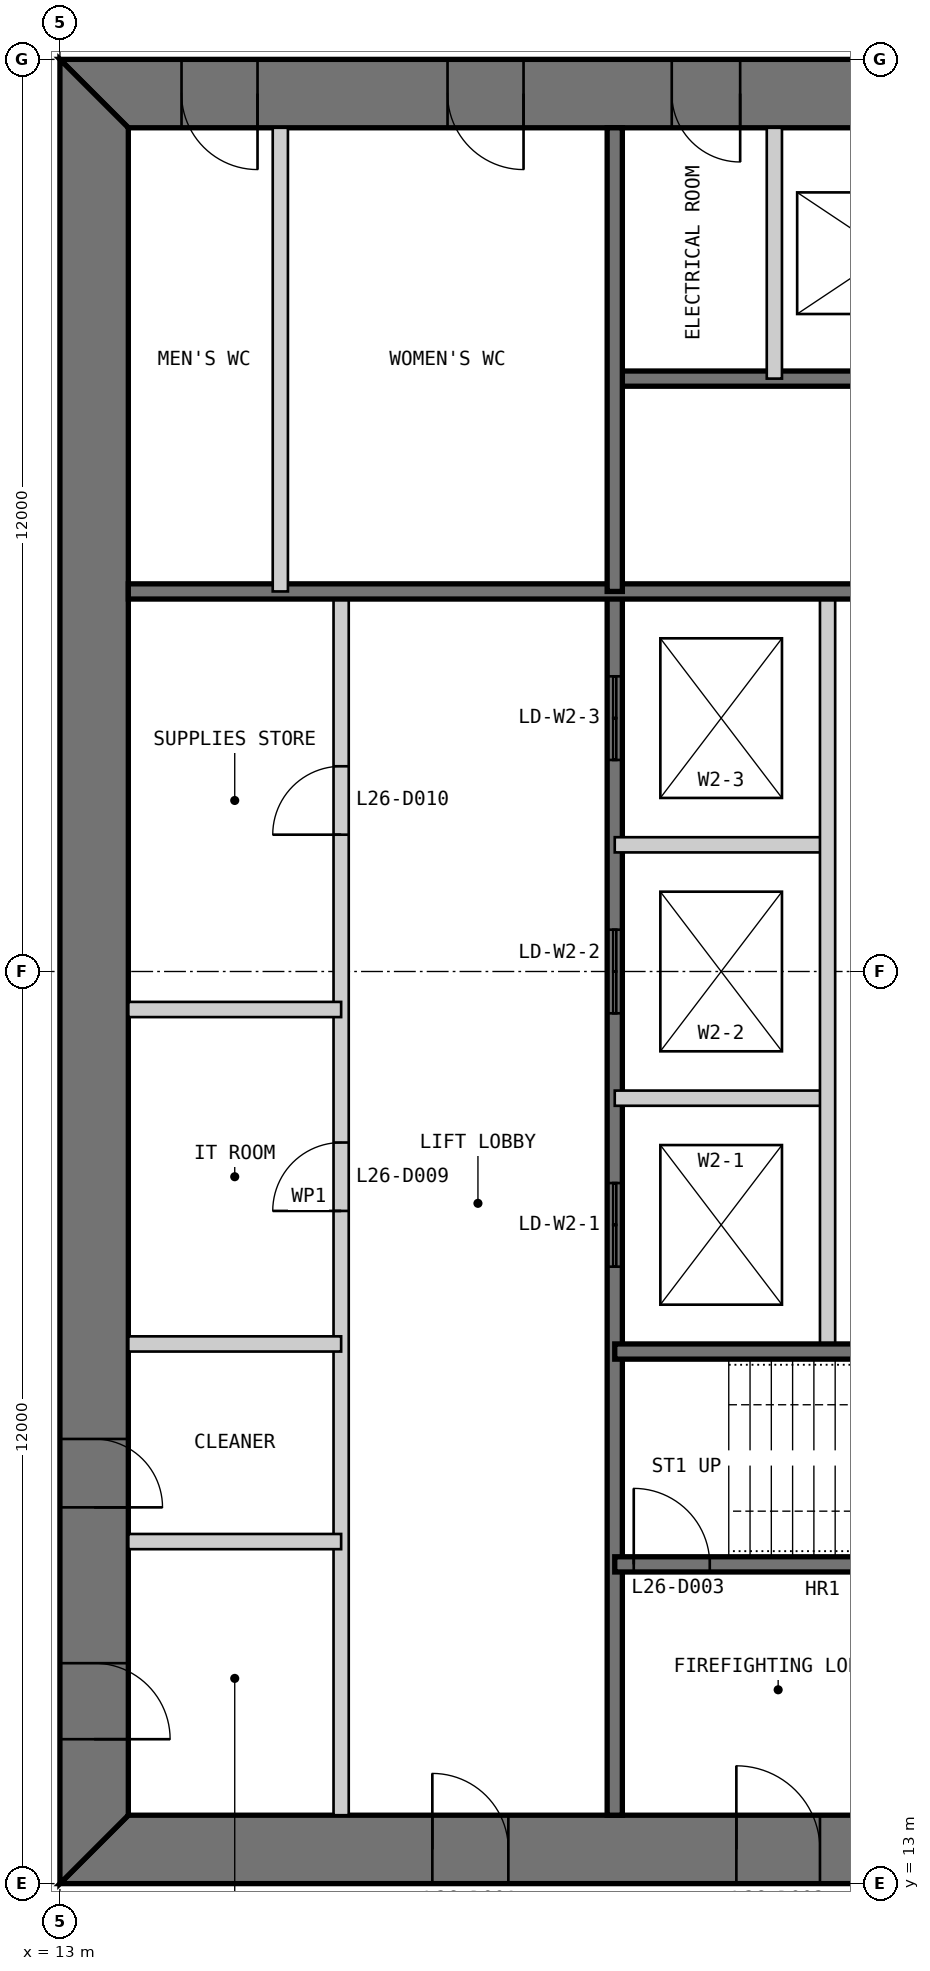
"""IFC4 building model, lengths in metres.
Left out: names, types, materials, properties, quantities, classifications, styles, units other than length and angle.
Written with IfcOpenShell. Run it as: python <this file> out.ifc"""

import sys

from ifc_helpers import new_model, si_unit, direction, frame, frame_2d, origin, place, context, subcontext, project, spatial, polyline, rectangle, outline, extrude, element, fill, save


model = new_model("IFC4")
c1 = context("Model", 3, precision=1e-05, world=origin(), true_north=direction((0.0, 1.0)))
c2 = subcontext(c1, "Body", "Model", "MODEL_VIEW")
j1 = project(units=[si_unit("LENGTHUNIT", "METRE"), si_unit("PLANEANGLEUNIT", "RADIAN")], contexts=[c1])
p1 = place(None, origin())
s1 = spatial("IfcSite", under=j1, at=p1, CompositionType="ELEMENT")
p2 = place(p1, origin())
s2 = spatial("IfcBuilding", under=s1, at=p2, CompositionType="ELEMENT")
p3 = place(p2, frame((0.0, 0.0, 114.4)))
s3 = spatial("IfcBuildingStorey", under=s2, at=p3, CompositionType="ELEMENT", Elevation=114.4)
p4 = place(p3, frame((13.0, 13.45, 0.0), z_axis=(0.0, 0.0, 1.0), x_axis=(1.0, 0.0, 0.0)))
e1 = element("IfcWall", 1, at=p4, inside=s3, PredefinedType="SHEAR", context=c2, shape_type="SweptSolid", body=[
    extrude(outline(polyline([(0.0, -0.45), (24.0, -0.45), (23.1, 0.45), (0.9, 0.45), (0.0, -0.45)])), origin(), (0.0, 0.0, 1.0), 4.0),
])
p5 = place(p4, frame((4.9, 0.0, 0.0)))
e2 = element("IfcOpeningElement", 2, at=p5, cuts=e1, PredefinedType="OPENING", context=c2, shape_type="SweptSolid", body=[
    extrude(rectangle(XDim=1.0, YDim=2.2, at=frame_2d((0.5, 1.1))), frame((0.0, 0.46, 0.0), z_axis=(0.0, -1.0, 0.0), x_axis=(1.0, 0.0, 0.0)), (0.0, 0.0, 1.0), 0.92),
])
p6 = place(p4, frame((8.9, 0.0, 0.0)))
e3 = element("IfcOpeningElement", 3, at=p6, cuts=e1, PredefinedType="OPENING", context=c2, shape_type="SweptSolid", body=[
    extrude(rectangle(XDim=1.1, YDim=2.2, at=frame_2d((0.55, 1.1))), frame((0.0, 0.46, 0.0), z_axis=(0.0, -1.0, 0.0), x_axis=(1.0, 0.0, 0.0)), (0.0, 0.0, 1.0), 0.92),
])
p7 = place(p4, frame((15.05, 0.0, 0.0)))
e4 = element("IfcOpeningElement", 4, at=p7, cuts=e1, PredefinedType="OPENING", context=c2, shape_type="SweptSolid", body=[
    extrude(rectangle(XDim=0.9, YDim=2.2, at=frame_2d((0.45, 1.1))), frame((0.0, 0.46, 0.0), z_axis=(0.0, -1.0, 0.0), x_axis=(1.0, 0.0, 0.0)), (0.0, 0.0, 1.0), 0.92),
])
p8 = place(p4, frame((17.9, 0.0, 0.0)))
e5 = element("IfcOpeningElement", 5, at=p8, cuts=e1, PredefinedType="OPENING", context=c2, shape_type="SweptSolid", body=[
    extrude(rectangle(XDim=1.0, YDim=2.2, at=frame_2d((0.5, 1.1))), frame((0.0, 0.46, 0.0), z_axis=(0.0, -1.0, 0.0), x_axis=(1.0, 0.0, 0.0)), (0.0, 0.0, 1.0), 0.92),
])
p9 = place(p4, frame((21.4, 0.0, 0.0)))
e6 = element("IfcOpeningElement", 6, at=p9, cuts=e1, PredefinedType="OPENING", context=c2, shape_type="SweptSolid", body=[
    extrude(rectangle(XDim=1.0, YDim=2.2, at=frame_2d((0.5, 1.1))), frame((0.0, 0.46, 0.0), z_axis=(0.0, -1.0, 0.0), x_axis=(1.0, 0.0, 0.0)), (0.0, 0.0, 1.0), 0.92),
])
p10 = place(p3, frame((37.0, 36.55, 0.0), z_axis=(0.0, 0.0, 1.0), x_axis=(-1.0, 0.0, 0.0)))
e7 = element("IfcWall", 7, at=p10, inside=s3, PredefinedType="SHEAR", context=c2, shape_type="SweptSolid", body=[
    extrude(outline(polyline([(0.0, -0.45), (24.0, -0.45), (23.1, 0.45), (0.9, 0.45), (0.0, -0.45)])), origin(), (0.0, 0.0, 1.0), 4.0),
])
p11 = place(p10, frame((4.9, 0.0, 0.0)))
e8 = element("IfcOpeningElement", 8, at=p11, cuts=e7, PredefinedType="OPENING", context=c2, shape_type="SweptSolid", body=[
    extrude(rectangle(XDim=1.0, YDim=2.2, at=frame_2d((0.5, 1.1))), frame((0.0, 0.46, 0.0), z_axis=(0.0, -1.0, 0.0), x_axis=(1.0, 0.0, 0.0)), (0.0, 0.0, 1.0), 0.92),
])
p12 = place(p10, frame((8.9, 0.0, 0.0)))
e9 = element("IfcOpeningElement", 9, at=p12, cuts=e7, PredefinedType="OPENING", context=c2, shape_type="SweptSolid", body=[
    extrude(rectangle(XDim=1.1, YDim=2.2, at=frame_2d((0.55, 1.1))), frame((0.0, 0.46, 0.0), z_axis=(0.0, -1.0, 0.0), x_axis=(1.0, 0.0, 0.0)), (0.0, 0.0, 1.0), 0.92),
])
p13 = place(p10, frame((15.05, 0.0, 0.0)))
e10 = element("IfcOpeningElement", 10, at=p13, cuts=e7, PredefinedType="OPENING", context=c2, shape_type="SweptSolid", body=[
    extrude(rectangle(XDim=0.9, YDim=2.2, at=frame_2d((0.45, 1.1))), frame((0.0, 0.46, 0.0), z_axis=(0.0, -1.0, 0.0), x_axis=(1.0, 0.0, 0.0)), (0.0, 0.0, 1.0), 0.92),
])
p14 = place(p10, frame((17.9, 0.0, 0.0)))
e11 = element("IfcOpeningElement", 11, at=p14, cuts=e7, PredefinedType="OPENING", context=c2, shape_type="SweptSolid", body=[
    extrude(rectangle(XDim=1.0, YDim=2.2, at=frame_2d((0.5, 1.1))), frame((0.0, 0.46, 0.0), z_axis=(0.0, -1.0, 0.0), x_axis=(1.0, 0.0, 0.0)), (0.0, 0.0, 1.0), 0.92),
])
p15 = place(p10, frame((21.4, 0.0, 0.0)))
e12 = element("IfcOpeningElement", 12, at=p15, cuts=e7, PredefinedType="OPENING", context=c2, shape_type="SweptSolid", body=[
    extrude(rectangle(XDim=1.0, YDim=2.2, at=frame_2d((0.5, 1.1))), frame((0.0, 0.46, 0.0), z_axis=(0.0, -1.0, 0.0), x_axis=(1.0, 0.0, 0.0)), (0.0, 0.0, 1.0), 0.92),
])
p16 = place(p3, frame((13.45, 36.1, 0.0), z_axis=(0.0, 0.0, 1.0), x_axis=(0.0, -1.0, 0.0)))
e13 = element("IfcWall", 13, at=p16, inside=s3, PredefinedType="SHEAR", context=c2, shape_type="SweptSolid", body=[
    extrude(outline(polyline([(-0.9, -0.45), (23.1, -0.45), (22.2, 0.45), (0.0, 0.45), (-0.9, -0.45)])), origin(), (0.0, 0.0, 1.0), 4.0),
])
p17 = place(p16, frame((20.2, 0.0, 0.0)))
e14 = element("IfcOpeningElement", 14, at=p17, cuts=e13, PredefinedType="OPENING", context=c2, shape_type="SweptSolid", body=[
    extrude(rectangle(XDim=1.0, YDim=2.2, at=frame_2d((0.5, 1.1))), frame((0.0, 0.46, 0.0), z_axis=(0.0, -1.0, 0.0), x_axis=(1.0, 0.0, 0.0)), (0.0, 0.0, 1.0), 0.92),
])
p18 = place(p16, frame((17.25, 0.0, 0.0)))
e15 = element("IfcOpeningElement", 15, at=p18, cuts=e13, PredefinedType="OPENING", context=c2, shape_type="SweptSolid", body=[
    extrude(rectangle(XDim=0.9, YDim=2.2, at=frame_2d((0.45, 1.1))), frame((0.0, 0.46, 0.0), z_axis=(0.0, -1.0, 0.0), x_axis=(1.0, 0.0, 0.0)), (0.0, 0.0, 1.0), 0.92),
])
p19 = place(p3, frame((16.7, 13.9, 0.0), z_axis=(0.0, 0.0, 1.0), x_axis=(0.0, 1.0, 0.0)))
e16 = element("IfcWall", 16, at=p19, inside=s3, PredefinedType="PARTITIONING", context=c2, shape_type="SweptSolid", body=[
    extrude(rectangle(XDim=16.1, YDim=0.2, at=frame_2d((8.05, 0.0))), origin(), (0.0, 0.0, 1.0), 3.8),
])
p20 = place(p19, frame((7.95, 0.0, 0.0)))
e17 = element("IfcOpeningElement", 17, at=p20, cuts=e16, PredefinedType="OPENING", context=c2, shape_type="SweptSolid", body=[
    extrude(rectangle(XDim=0.9, YDim=2.2, at=frame_2d((0.45, 1.1))), frame((0.0, 0.11, 0.0), z_axis=(0.0, -1.0, 0.0), x_axis=(1.0, 0.0, 0.0)), (0.0, 0.0, 1.0), 0.22),
])
p21 = place(p19, frame((12.9, 0.0, 0.0)))
e18 = element("IfcOpeningElement", 18, at=p21, cuts=e16, PredefinedType="OPENING", context=c2, shape_type="SweptSolid", body=[
    extrude(rectangle(XDim=0.9, YDim=2.2, at=frame_2d((0.45, 1.1))), frame((0.0, 0.11, 0.0), z_axis=(0.0, -1.0, 0.0), x_axis=(1.0, 0.0, 0.0)), (0.0, 0.0, 1.0), 0.22),
])
p22 = place(p3, frame((20.3, 13.9, 0.0), z_axis=(0.0, 0.0, 1.0), x_axis=(0.0, 1.0, 0.0)))
e19 = element("IfcWall", 19, at=p22, inside=s3, PredefinedType="SOLIDWALL", context=c2, shape_type="SweptSolid", body=[
    extrude(rectangle(XDim=16.1, YDim=0.2, at=frame_2d((8.05, 0.0))), origin(), (0.0, 0.0, 1.0), 3.8),
])
p23 = place(p22, frame((7.217, 0.0, 0.0)))
e20 = element("IfcOpeningElement", 20, at=p23, cuts=e19, PredefinedType="OPENING", context=c2, shape_type="SweptSolid", body=[
    extrude(rectangle(XDim=1.1, YDim=2.2, at=frame_2d((0.55, 1.1))), frame((0.0, 0.11, 0.0), z_axis=(0.0, -1.0, 0.0), x_axis=(1.0, 0.0, 0.0)), (0.0, 0.0, 1.0), 0.22),
])
p24 = place(p22, frame((10.55, 0.0, 0.0)))
e21 = element("IfcOpeningElement", 21, at=p24, cuts=e19, PredefinedType="OPENING", context=c2, shape_type="SweptSolid", body=[
    extrude(rectangle(XDim=1.1, YDim=2.2, at=frame_2d((0.55, 1.1))), frame((0.0, 0.11, 0.0), z_axis=(0.0, -1.0, 0.0), x_axis=(1.0, 0.0, 0.0)), (0.0, 0.0, 1.0), 0.22),
])
p25 = place(p22, frame((13.883, 0.0, 0.0)))
e22 = element("IfcOpeningElement", 22, at=p25, cuts=e19, PredefinedType="OPENING", context=c2, shape_type="SweptSolid", body=[
    extrude(rectangle(XDim=1.1, YDim=2.2, at=frame_2d((0.55, 1.1))), frame((0.0, 0.11, 0.0), z_axis=(0.0, -1.0, 0.0), x_axis=(1.0, 0.0, 0.0)), (0.0, 0.0, 1.0), 0.22),
])
for number, where, z_axis, x_axis in (
    (23, (20.3, 23.333, 0.0), (0.0, 0.0, 1.0), (1.0, 0.0, 0.0)),
    (24, (20.3, 26.667, 0.0), (0.0, 0.0, 1.0), (1.0, 0.0, 0.0)),
):
    element("IfcWall", number, at=place(p3, frame(where, z_axis=z_axis, x_axis=x_axis)), inside=s3, PredefinedType="PARTITIONING", context=c2, shape_type="SweptSolid", body=[
        extrude(rectangle(XDim=2.8, YDim=0.2, at=frame_2d((1.4, 0.0))), origin(), (0.0, 0.0, 1.0), 3.8),
    ])
p26 = place(p3, frame((23.1, 20.0, 0.0), z_axis=(0.0, 0.0, 1.0), x_axis=(0.0, 1.0, 0.0)))
e25 = element("IfcWall", 25, at=p26, inside=s3, PredefinedType="PARTITIONING", context=c2, shape_type="SweptSolid", body=[
    extrude(rectangle(XDim=10.0, YDim=0.2, at=frame_2d((5.0, 0.0))), origin(), (0.0, 0.0, 1.0), 3.8),
])
p27 = place(p3, frame((20.3, 17.2, 0.0), z_axis=(0.0, 0.0, 1.0), x_axis=(1.0, 0.0, 0.0)))
e26 = element("IfcWall", 26, at=p27, inside=s3, PredefinedType="SOLIDWALL", context=c2, shape_type="SweptSolid", body=[
    extrude(rectangle(XDim=9.4, YDim=0.2, at=frame_2d((4.7, 0.0))), origin(), (0.0, 0.0, 1.0), 3.8),
])
p28 = place(p27, frame((0.25, 0.0, 0.0)))
e27 = element("IfcOpeningElement", 27, at=p28, cuts=e26, PredefinedType="OPENING", context=c2, shape_type="SweptSolid", body=[
    extrude(rectangle(XDim=1.0, YDim=2.2, at=frame_2d((0.5, 1.1))), frame((0.0, 0.11, 0.0), z_axis=(0.0, -1.0, 0.0), x_axis=(1.0, 0.0, 0.0)), (0.0, 0.0, 1.0), 0.22),
])
p29 = place(p3, frame((20.3, 20.0, 0.0), z_axis=(0.0, 0.0, 1.0), x_axis=(1.0, 0.0, 0.0)))
e28 = element("IfcWall", 28, at=p29, inside=s3, PredefinedType="SOLIDWALL", context=c2, shape_type="SweptSolid", body=[
    extrude(rectangle(XDim=15.8, YDim=0.2, at=frame_2d((7.9, 0.0))), origin(), (0.0, 0.0, 1.0), 3.8),
])
for number, where, z_axis, x_axis in (
    (29, (13.9, 17.5, 0.0), (0.0, 0.0, 1.0), (1.0, 0.0, 0.0)),
    (30, (13.9, 20.1, 0.0), (0.0, 0.0, 1.0), (1.0, 0.0, 0.0)),
    (31, (13.9, 24.5, 0.0), (0.0, 0.0, 1.0), (1.0, 0.0, 0.0)),
):
    element("IfcWall", number, at=place(p3, frame(where, z_axis=z_axis, x_axis=x_axis)), inside=s3, PredefinedType="PARTITIONING", context=c2, shape_type="SweptSolid", body=[
        extrude(rectangle(XDim=2.8, YDim=0.2, at=frame_2d((1.4, 0.0))), origin(), (0.0, 0.0, 1.0), 3.8),
    ])
p30 = place(p3, frame((29.7, 32.8, 0.0), z_axis=(0.0, 0.0, 1.0), x_axis=(-1.0, 0.0, 0.0)))
e32 = element("IfcWall", 32, at=p30, inside=s3, PredefinedType="SOLIDWALL", context=c2, shape_type="SweptSolid", body=[
    extrude(rectangle(XDim=9.4, YDim=0.2, at=frame_2d((4.7, 0.0))), origin(), (0.0, 0.0, 1.0), 3.8),
])
p31 = place(p30, frame((0.25, 0.0, 0.0)))
e33 = element("IfcOpeningElement", 33, at=p31, cuts=e32, PredefinedType="OPENING", context=c2, shape_type="SweptSolid", body=[
    extrude(rectangle(XDim=1.0, YDim=2.2, at=frame_2d((0.5, 1.1))), frame((0.0, 0.11, 0.0), z_axis=(0.0, -1.0, 0.0), x_axis=(1.0, 0.0, 0.0)), (0.0, 0.0, 1.0), 0.22),
])
p32 = place(p3, frame((29.7, 30.0, 0.0), z_axis=(0.0, 0.0, 1.0), x_axis=(-1.0, 0.0, 0.0)))
e34 = element("IfcWall", 34, at=p32, inside=s3, PredefinedType="SOLIDWALL", context=c2, shape_type="SweptSolid", body=[
    extrude(rectangle(XDim=15.8, YDim=0.2, at=frame_2d((7.9, 0.0))), origin(), (0.0, 0.0, 1.0), 3.8),
])
p33 = place(p3, frame((22.4, 36.1, 0.0), z_axis=(0.0, 0.0, 1.0), x_axis=(0.0, -1.0, 0.0)))
e35 = element("IfcWall", 35, at=p33, inside=s3, PredefinedType="PARTITIONING", context=c2, shape_type="SweptSolid", body=[
    extrude(rectangle(XDim=3.3, YDim=0.2, at=frame_2d((1.65, 0.0))), origin(), (0.0, 0.0, 1.0), 3.8),
])
p34 = place(p3, frame((20.3, 36.1, 0.0), z_axis=(0.0, 0.0, 1.0), x_axis=(0.0, -1.0, 0.0)))
e36 = element("IfcWall", 36, at=p34, inside=s3, PredefinedType="SOLIDWALL", context=c2, shape_type="SweptSolid", body=[
    extrude(rectangle(XDim=6.1, YDim=0.2, at=frame_2d((3.05, 0.0))), origin(), (0.0, 0.0, 1.0), 3.8),
])
p35 = place(p3, frame((15.9, 36.1, 0.0), z_axis=(0.0, 0.0, 1.0), x_axis=(0.0, -1.0, 0.0)))
e37 = element("IfcWall", 37, at=p35, inside=s3, PredefinedType="PARTITIONING", context=c2, shape_type="SweptSolid", body=[
    extrude(rectangle(XDim=6.1, YDim=0.2, at=frame_2d((3.05, 0.0))), origin(), (0.0, 0.0, 1.0), 3.8),
])
p36 = place(p5, origin())
e38 = element("IfcDoor", 38, at=p36, inside=s3, OperationType="SINGLE_SWING_LEFT", PredefinedType="DOOR", context=c2, shape_type="SweptSolid", body=[
    extrude(rectangle(XDim=1.0, YDim=2.2, at=frame_2d((0.5, 1.1))), frame((0.0, 0.025, 0.0), z_axis=(0.0, -1.0, 0.0), x_axis=(1.0, 0.0, 0.0)), (0.0, 0.0, 1.0), 0.05),
    extrude(outline(polyline([(0.0, 0.0), (0.04, 0.0), (0.04, 2.16), (0.96, 2.16), (0.96, 0.0), (1.0, 0.0), (1.0, 2.2), (0.0, 2.2), (0.0, 0.0)])), frame((0.0, 0.3, 0.0), z_axis=(0.0, -1.0, 0.0), x_axis=(1.0, 0.0, 0.0)), (0.0, 0.0, 1.0), 0.6),
])
fill(e2, e38)
p37 = place(p6, origin())
e39 = element("IfcDoor", 39, at=p37, inside=s3, OperationType="SINGLE_SWING_LEFT", PredefinedType="DOOR", context=c2, shape_type="SweptSolid", body=[
    extrude(rectangle(XDim=1.1, YDim=2.2, at=frame_2d((0.55, 1.1))), frame((0.0, 0.025, 0.0), z_axis=(0.0, -1.0, 0.0), x_axis=(1.0, 0.0, 0.0)), (0.0, 0.0, 1.0), 0.05),
    extrude(outline(polyline([(0.0, 0.0), (0.04, 0.0), (0.04, 2.16), (1.06, 2.16), (1.06, 0.0), (1.1, 0.0), (1.1, 2.2), (0.0, 2.2), (0.0, 0.0)])), frame((0.0, 0.3, 0.0), z_axis=(0.0, -1.0, 0.0), x_axis=(1.0, 0.0, 0.0)), (0.0, 0.0, 1.0), 0.6),
])
fill(e3, e39)
p38 = place(p28, origin())
e40 = element("IfcDoor", 40, at=p38, inside=s3, OperationType="SINGLE_SWING_LEFT", PredefinedType="DOOR", context=c2, shape_type="SweptSolid", body=[
    extrude(rectangle(XDim=1.0, YDim=2.2, at=frame_2d((0.5, 1.1))), frame((0.0, 0.025, 0.0), z_axis=(0.0, -1.0, 0.0), x_axis=(1.0, 0.0, 0.0)), (0.0, 0.0, 1.0), 0.05),
])
fill(e27, e40)
p39 = place(p17, origin())
e41 = element("IfcDoor", 41, at=p39, inside=s3, OperationType="SINGLE_SWING_RIGHT", PredefinedType="DOOR", context=c2, shape_type="SweptSolid", body=[
    extrude(rectangle(XDim=1.0, YDim=2.2, at=frame_2d((0.5, 1.1))), frame((0.0, 0.025, 0.0), z_axis=(0.0, -1.0, 0.0), x_axis=(1.0, 0.0, 0.0)), (0.0, 0.0, 1.0), 0.05),
    extrude(outline(polyline([(0.0, 0.0), (0.04, 0.0), (0.04, 2.16), (0.96, 2.16), (0.96, 0.0), (1.0, 0.0), (1.0, 2.2), (0.0, 2.2), (0.0, 0.0)])), frame((0.0, 0.3, 0.0), z_axis=(0.0, -1.0, 0.0), x_axis=(1.0, 0.0, 0.0)), (0.0, 0.0, 1.0), 0.6),
])
fill(e14, e41)
p40 = place(p18, origin())
e42 = element("IfcDoor", 42, at=p40, inside=s3, OperationType="SINGLE_SWING_RIGHT", PredefinedType="DOOR", context=c2, shape_type="SweptSolid", body=[
    extrude(rectangle(XDim=0.9, YDim=2.2, at=frame_2d((0.45, 1.1))), frame((0.0, 0.025, 0.0), z_axis=(0.0, -1.0, 0.0), x_axis=(1.0, 0.0, 0.0)), (0.0, 0.0, 1.0), 0.05),
    extrude(outline(polyline([(0.0, 0.0), (0.04, 0.0), (0.04, 2.16), (0.86, 2.16), (0.86, 0.0), (0.9, 0.0), (0.9, 2.2), (0.0, 2.2), (0.0, 0.0)])), frame((0.0, 0.3, 0.0), z_axis=(0.0, -1.0, 0.0), x_axis=(1.0, 0.0, 0.0)), (0.0, 0.0, 1.0), 0.6),
])
fill(e15, e42)
p41 = place(p20, origin())
e43 = element("IfcDoor", 43, at=p41, inside=s3, OperationType="SINGLE_SWING_LEFT", PredefinedType="DOOR", context=c2, shape_type="SweptSolid", body=[
    extrude(rectangle(XDim=0.9, YDim=2.2, at=frame_2d((0.45, 1.1))), frame((0.0, 0.025, 0.0), z_axis=(0.0, -1.0, 0.0), x_axis=(1.0, 0.0, 0.0)), (0.0, 0.0, 1.0), 0.05),
])
fill(e17, e43)
p42 = place(p21, origin())
e44 = element("IfcDoor", 44, at=p42, inside=s3, OperationType="SINGLE_SWING_LEFT", PredefinedType="DOOR", context=c2, shape_type="SweptSolid", body=[
    extrude(rectangle(XDim=0.9, YDim=2.2, at=frame_2d((0.45, 1.1))), frame((0.0, 0.025, 0.0), z_axis=(0.0, -1.0, 0.0), x_axis=(1.0, 0.0, 0.0)), (0.0, 0.0, 1.0), 0.05),
])
fill(e18, e44)
p43 = place(p13, origin())
e45 = element("IfcDoor", 45, at=p43, inside=s3, OperationType="SINGLE_SWING_LEFT", PredefinedType="DOOR", context=c2, shape_type="SweptSolid", body=[
    extrude(rectangle(XDim=0.9, YDim=2.2, at=frame_2d((0.45, 1.1))), frame((0.0, 0.025, 0.0), z_axis=(0.0, -1.0, 0.0), x_axis=(1.0, 0.0, 0.0)), (0.0, 0.0, 1.0), 0.05),
    extrude(outline(polyline([(0.0, 0.0), (0.04, 0.0), (0.04, 2.16), (0.86, 2.16), (0.86, 0.0), (0.9, 0.0), (0.9, 2.2), (0.0, 2.2), (0.0, 0.0)])), frame((0.0, 0.3, 0.0), z_axis=(0.0, -1.0, 0.0), x_axis=(1.0, 0.0, 0.0)), (0.0, 0.0, 1.0), 0.6),
])
fill(e10, e45)
p44 = place(p14, origin())
e46 = element("IfcDoor", 46, at=p44, inside=s3, OperationType="SINGLE_SWING_LEFT", PredefinedType="DOOR", context=c2, shape_type="SweptSolid", body=[
    extrude(rectangle(XDim=1.0, YDim=2.2, at=frame_2d((0.5, 1.1))), frame((0.0, 0.025, 0.0), z_axis=(0.0, -1.0, 0.0), x_axis=(1.0, 0.0, 0.0)), (0.0, 0.0, 1.0), 0.05),
    extrude(outline(polyline([(0.0, 0.0), (0.04, 0.0), (0.04, 2.16), (0.96, 2.16), (0.96, 0.0), (1.0, 0.0), (1.0, 2.2), (0.0, 2.2), (0.0, 0.0)])), frame((0.0, 0.3, 0.0), z_axis=(0.0, -1.0, 0.0), x_axis=(1.0, 0.0, 0.0)), (0.0, 0.0, 1.0), 0.6),
])
fill(e11, e46)
p45 = place(p15, origin())
e47 = element("IfcDoor", 47, at=p45, inside=s3, OperationType="SINGLE_SWING_LEFT", PredefinedType="DOOR", context=c2, shape_type="SweptSolid", body=[
    extrude(rectangle(XDim=1.0, YDim=2.2, at=frame_2d((0.5, 1.1))), frame((0.0, 0.025, 0.0), z_axis=(0.0, -1.0, 0.0), x_axis=(1.0, 0.0, 0.0)), (0.0, 0.0, 1.0), 0.05),
    extrude(outline(polyline([(0.0, 0.0), (0.04, 0.0), (0.04, 2.16), (0.96, 2.16), (0.96, 0.0), (1.0, 0.0), (1.0, 2.2), (0.0, 2.2), (0.0, 0.0)])), frame((0.0, 0.3, 0.0), z_axis=(0.0, -1.0, 0.0), x_axis=(1.0, 0.0, 0.0)), (0.0, 0.0, 1.0), 0.6),
])
fill(e12, e47)
p46 = place(p23, origin())
e48 = element("IfcDoor", 48, at=p46, inside=s3, OperationType="DOUBLE_DOOR_SLIDING", PredefinedType="DOOR", context=c2, shape_type="SweptSolid", body=[
    extrude(rectangle(XDim=1.1, YDim=2.2, at=frame_2d((0.55, 1.1))), frame((0.0, 0.025, 0.0), z_axis=(0.0, -1.0, 0.0), x_axis=(1.0, 0.0, 0.0)), (0.0, 0.0, 1.0), 0.05),
])
fill(e20, e48)
p47 = place(p24, origin())
e49 = element("IfcDoor", 49, at=p47, inside=s3, OperationType="DOUBLE_DOOR_SLIDING", PredefinedType="DOOR", context=c2, shape_type="SweptSolid", body=[
    extrude(rectangle(XDim=1.1, YDim=2.2, at=frame_2d((0.55, 1.1))), frame((0.0, 0.025, 0.0), z_axis=(0.0, -1.0, 0.0), x_axis=(1.0, 0.0, 0.0)), (0.0, 0.0, 1.0), 0.05),
])
fill(e21, e49)
p48 = place(p25, origin())
e50 = element("IfcDoor", 50, at=p48, inside=s3, OperationType="DOUBLE_DOOR_SLIDING", PredefinedType="DOOR", context=c2, shape_type="SweptSolid", body=[
    extrude(rectangle(XDim=1.1, YDim=2.2, at=frame_2d((0.55, 1.1))), frame((0.0, 0.025, 0.0), z_axis=(0.0, -1.0, 0.0), x_axis=(1.0, 0.0, 0.0)), (0.0, 0.0, 1.0), 0.05),
])
fill(e22, e50)
save(model, sys.argv[1])
